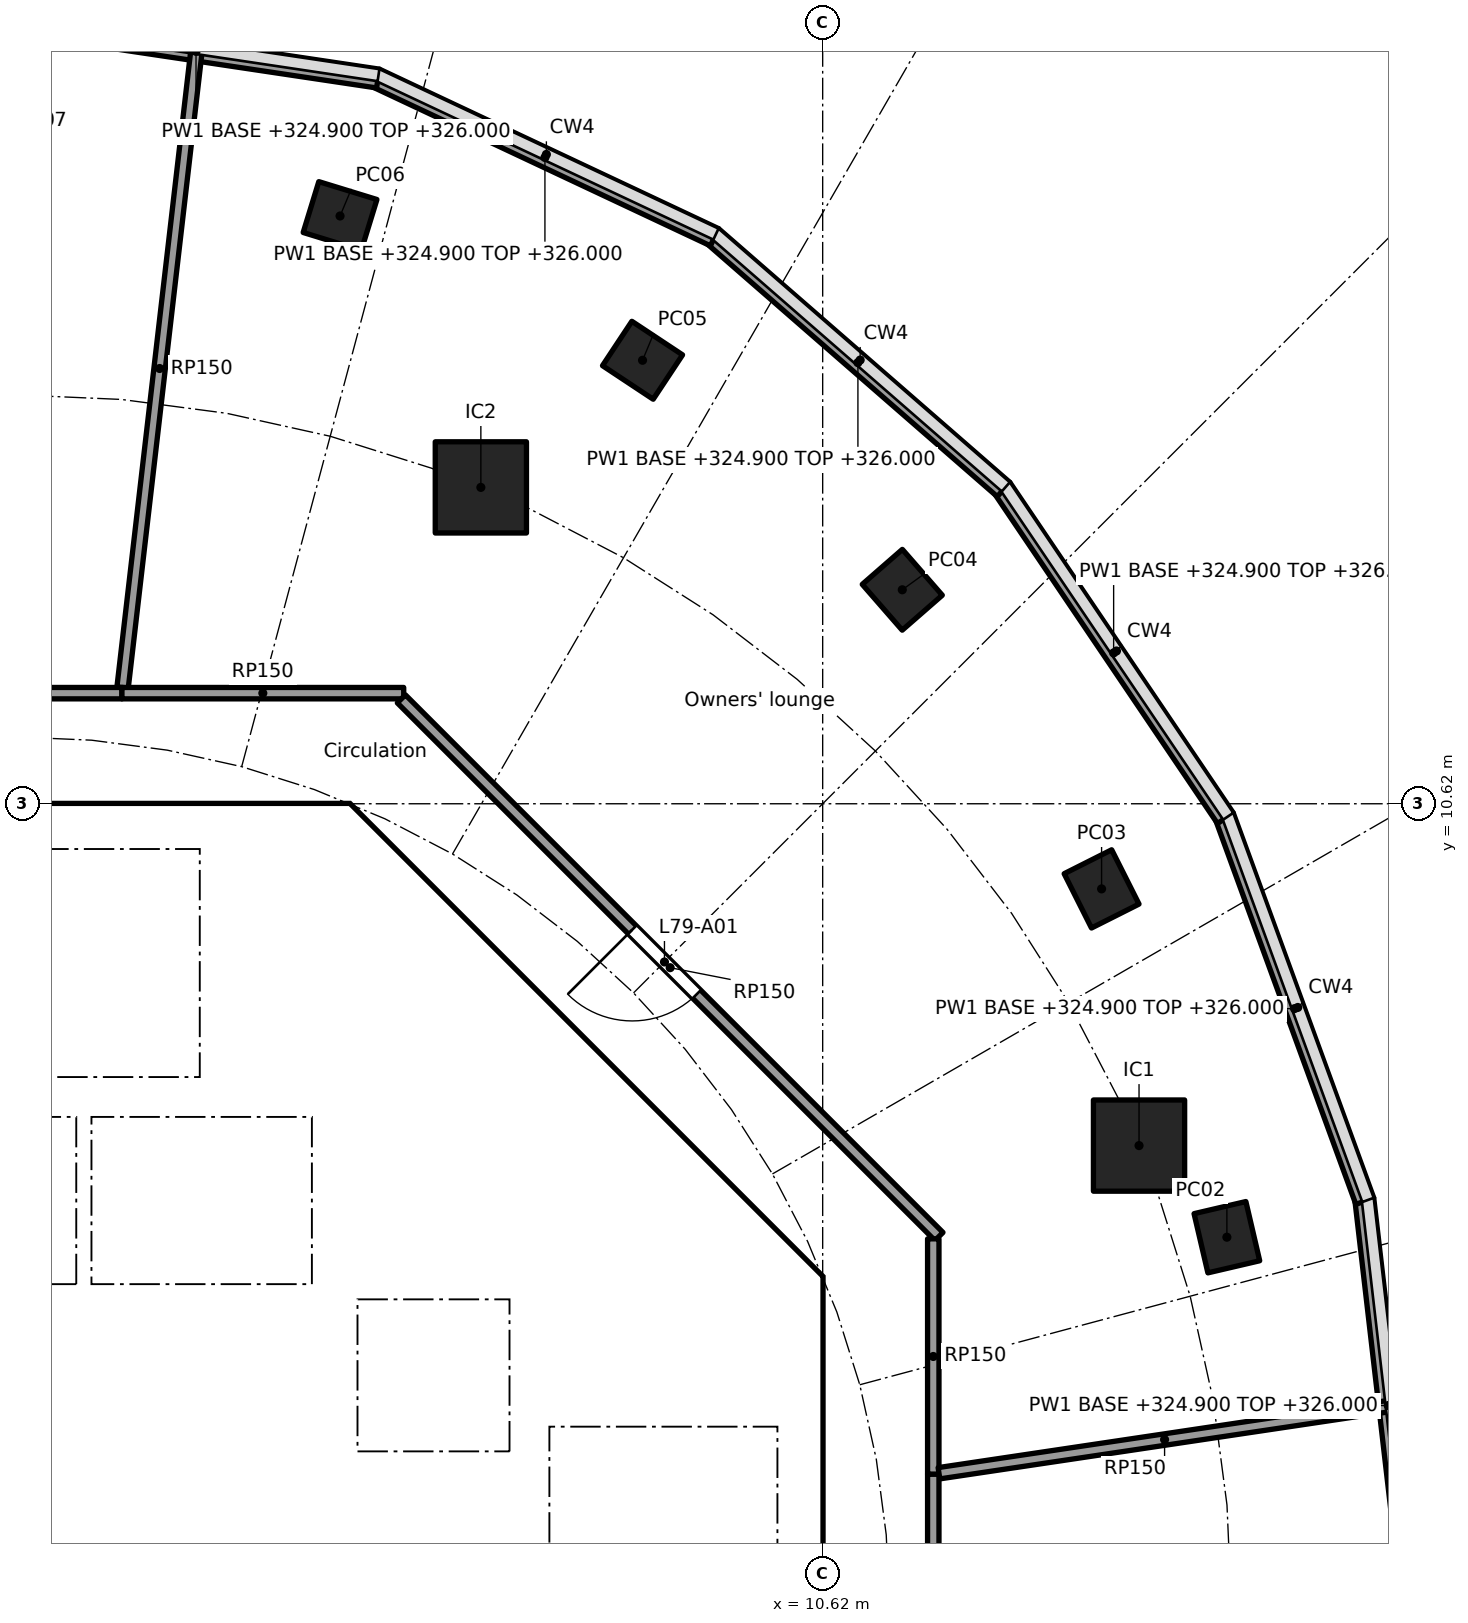
"""IFC4 building model, lengths in metres.
Left out: names, types, materials, properties, quantities, classifications, styles, units other than length and angle.
Written with IfcOpenShell. Run it as: python <this file> out.ifc"""

import sys

from ifc_helpers import new_model, si_unit, direction, frame, frame_2d, origin, origin_2d, place, context, subcontext, project, spatial, polyline, rectangle, hollow_rectangle, outline, extrude, element, fill, save


model = new_model("IFC4")
c1 = context("Model", 3, precision=1e-05, world=origin(), true_north=direction((0.0, 1.0)))
c2 = subcontext(c1, "Body", "Model", "MODEL_VIEW")
j1 = project(units=[si_unit("LENGTHUNIT", "METRE"), si_unit("PLANEANGLEUNIT", "RADIAN")], contexts=[c1])
p1 = place(None, origin())
s1 = spatial("IfcSite", under=j1, at=p1, CompositionType="ELEMENT")
p2 = place(p1, origin())
s2 = spatial("IfcBuilding", under=s1, at=p2, CompositionType="ELEMENT")
p3 = place(p2, frame((0.0, 0.0, 320.4)))
s3 = spatial("IfcBuildingStorey", under=s2, at=p3, CompositionType="ELEMENT", Elevation=320.4)
for number, where, z_axis, x_axis in (
    (1, (15.938, 4.917, 0.0), (0.0, 0.0, 1.0), (-0.227, 0.974, 0.0)),
    (2, (14.289, 9.5, 0.0), (0.0, 0.0, 1.0), (-0.45, 0.893, 0.0)),
    (3, (11.667, 13.435, 0.0), (0.0, 0.0, 1.0), (-0.657, 0.754, 0.0)),
    (4, (8.25, 16.455, 0.0), (0.0, 0.0, 1.0), (-0.834, 0.552, 0.0)),
    (5, (4.271, 18.353, 0.0), (0.0, 0.0, 1.0), (-0.956, 0.294, 0.0)),
):
    element("IfcColumn", number, at=place(p3, frame(where, z_axis=z_axis, x_axis=x_axis)), inside=s3, PredefinedType="COLUMN", context=c2, shape_type="SweptSolid", body=[
        extrude(hollow_rectangle(XDim=0.8, YDim=0.7, WallThickness=0.025, at=origin_2d()), origin(), (0.0, 0.0, 1.0), 4.5),
    ])
for number, where, z_axis, x_axis in (
    (6, (14.782, 6.123, 0.0), (0.0, 0.0, 1.0), (1.0, 0.0, 0.0)),
    (7, (6.123, 14.782, 0.0), (0.0, 0.0, 1.0), (1.0, 0.0, 0.0)),
):
    element("IfcColumn", number, at=place(p3, frame(where, z_axis=z_axis, x_axis=x_axis)), inside=s3, PredefinedType="COLUMN", context=c2, shape_type="SweptSolid", body=[
        extrude(rectangle(XDim=1.2, YDim=1.2, at=origin_2d()), origin(), (0.0, 0.0, 1.0), 4.5),
    ])
p4 = place(p3, frame((18.376, -0.014, 4.5), z_axis=(0.0, 0.0, 1.0), x_axis=(-0.115204975707, 0.993341740577, 0.0)))
e8 = element("IfcWall", 8, at=p4, inside=s3, PredefinedType="PARAPET", context=c2, shape_type="SweptSolid", body=[
    extrude(rectangle(XDim=5.472, YDim=0.25, at=frame_2d((2.736, 0.0))), origin(), (0.0, 0.0, 1.0), 1.1),
])
p5 = place(p3, frame((17.752, 5.392, 4.5), z_axis=(0.0, 0.0, 1.0), x_axis=(-0.342797263009, 0.939409408338, 0.0)))
e9 = element("IfcWall", 9, at=p5, inside=s3, PredefinedType="PARAPET", context=c2, shape_type="SweptSolid", body=[
    extrude(rectangle(XDim=5.391, YDim=0.25, at=frame_2d((2.696, 0.0))), origin(), (0.0, 0.0, 1.0), 1.1),
])
p6 = place(p3, frame((15.918, 10.43, 4.5), z_axis=(0.0, 0.0, 1.0), x_axis=(-0.560011865881, 0.828484586503, 0.0)))
e10 = element("IfcWall", 10, at=p6, inside=s3, PredefinedType="PARAPET", context=c2, shape_type="SweptSolid", body=[
    extrude(rectangle(XDim=5.25, YDim=0.25, at=frame_2d((2.625, 0.0))), origin(), (0.0, 0.0, 1.0), 1.1),
])
p7 = place(p3, frame((12.999, 14.755, 4.5), z_axis=(0.0, 0.0, 1.0), x_axis=(-0.754036302734, 0.656832744432, 0.0)))
e11 = element("IfcWall", 11, at=p7, inside=s3, PredefinedType="PARAPET", context=c2, shape_type="SweptSolid", body=[
    extrude(rectangle(XDim=5.081, YDim=0.25, at=frame_2d((2.541, 0.0))), origin(), (0.0, 0.0, 1.0), 1.1),
])
p8 = place(p3, frame((9.197, 18.073, 4.5), z_axis=(0.0, 0.0, 1.0), x_axis=(-0.904961168887, 0.425494163069, 0.0)))
e12 = element("IfcWall", 12, at=p8, inside=s3, PredefinedType="PARAPET", context=c2, shape_type="SweptSolid", body=[
    extrude(rectangle(XDim=4.93, YDim=0.25, at=frame_2d((2.465, 0.0))), origin(), (0.0, 0.0, 1.0), 1.1),
])
p9 = place(p3, frame((4.77, 20.161, 4.5), z_axis=(0.0, 0.0, 1.0), x_axis=(-0.989017208571, 0.147800409847, 0.0)))
e13 = element("IfcWall", 13, at=p9, inside=s3, PredefinedType="PARAPET", context=c2, shape_type="SweptSolid", body=[
    extrude(rectangle(XDim=4.842, YDim=0.25, at=frame_2d((2.421, 0.0))), origin(), (0.0, 0.0, 1.0), 1.1),
])
p10 = place(p3, frame((9.988, 4.613, 0.0), z_axis=(0.0, 0.0, 1.0), x_axis=(-0.707106781187, 0.707106781187, 0.0)))
e14 = element("IfcWall", 14, at=p10, inside=s3, PredefinedType="SHEAR", context=c2, shape_type="SweptSolid", body=[
    extrude(rectangle(XDim=7.602, YDim=0.6, at=frame_2d((3.801, 0.0))), origin(), (0.0, 0.0, 1.0), 4.2),
])
p11 = place(p10, frame((3.201, 0.0, 0.0)))
e15 = element("IfcOpeningElement", 15, at=p11, cuts=e14, PredefinedType="OPENING", context=c2, shape_type="SweptSolid", body=[
    extrude(rectangle(XDim=1.2, YDim=2.1, at=frame_2d((0.6, 1.05))), frame((0.0, 0.31, 0.0), z_axis=(0.0, -1.0, 0.0), x_axis=(1.0, 0.0, 0.0)), (0.0, 0.0, 1.0), 0.62),
])
p12 = place(p3, frame((4.0, 4.3, 0.0), z_axis=(0.0, 0.0, 1.0), x_axis=(0.0, 1.0, 0.0)))
e16 = element("IfcWall", 16, at=p12, inside=s3, PredefinedType="SOLIDWALL", context=c2, shape_type="SweptSolid", body=[
    extrude(rectangle(XDim=2.2, YDim=0.2, at=frame_2d((1.1, 0.0))), origin(), (0.0, 0.0, 1.0), 4.2),
])
p13 = place(p12, frame((0.55, 0.0, 0.0)))
e17 = element("IfcOpeningElement", 17, at=p13, cuts=e16, PredefinedType="OPENING", context=c2, shape_type="SweptSolid", body=[
    extrude(rectangle(XDim=1.1, YDim=2.1, at=frame_2d((0.55, 1.05))), frame((0.0, 0.11, 0.0), z_axis=(0.0, -1.0, 0.0), x_axis=(1.0, 0.0, 0.0)), (0.0, 0.0, 1.0), 0.22),
])
p14 = place(p3, frame((-6.7, 2.0, 0.0), z_axis=(0.0, 0.0, 1.0), x_axis=(1.0, 0.0, 0.0)))
e18 = element("IfcWall", 18, at=p14, inside=s3, PredefinedType="SOLIDWALL", context=c2, shape_type="SweptSolid", body=[
    extrude(rectangle(XDim=13.4, YDim=0.2, at=frame_2d((6.7, 0.0))), origin(), (0.0, 0.0, 1.0), 4.2),
])
p15 = place(p14, frame((11.65, 0.0, 0.0)))
e19 = element("IfcOpeningElement", 19, at=p15, cuts=e18, PredefinedType="OPENING", context=c2, shape_type="SweptSolid", body=[
    extrude(rectangle(XDim=1.1, YDim=2.1, at=frame_2d((0.55, 1.05))), frame((0.0, 0.11, 0.0), z_axis=(0.0, -1.0, 0.0), x_axis=(1.0, 0.0, 0.0)), (0.0, 0.0, 1.0), 0.22),
])
p16 = place(p14, frame((1.85, 0.0, 0.0)))
e20 = element("IfcOpeningElement", 20, at=p16, cuts=e18, PredefinedType="OPENING", context=c2, shape_type="SweptSolid", body=[
    extrude(rectangle(XDim=0.9, YDim=2.1, at=frame_2d((0.45, 1.05))), frame((0.0, 0.11, 0.0), z_axis=(0.0, -1.0, 0.0), x_axis=(1.0, 0.0, 0.0)), (0.0, 0.0, 1.0), 0.22),
])
p17 = place(p14, frame((5.15, 0.0, 0.0)))
e21 = element("IfcOpeningElement", 21, at=p17, cuts=e18, PredefinedType="OPENING", context=c2, shape_type="SweptSolid", body=[
    extrude(rectangle(XDim=0.9, YDim=2.1, at=frame_2d((0.45, 1.05))), frame((0.0, 0.11, 0.0), z_axis=(0.0, -1.0, 0.0), x_axis=(1.0, 0.0, 0.0)), (0.0, 0.0, 1.0), 0.22),
])
p18 = place(p14, frame((8.45, 0.0, 0.0)))
e22 = element("IfcOpeningElement", 22, at=p18, cuts=e18, PredefinedType="OPENING", context=c2, shape_type="SweptSolid", body=[
    extrude(rectangle(XDim=0.9, YDim=2.1, at=frame_2d((0.45, 1.05))), frame((0.0, 0.11, 0.0), z_axis=(0.0, -1.0, 0.0), x_axis=(1.0, 0.0, 0.0)), (0.0, 0.0, 1.0), 0.22),
])
p19 = place(p3, frame((6.7, 4.0, 0.0), z_axis=(0.0, 0.0, 1.0), x_axis=(1.0, 0.0, 0.0)))
e23 = element("IfcWall", 23, at=p19, inside=s3, PredefinedType="SOLIDWALL", context=c2, shape_type="SweptSolid", body=[
    extrude(rectangle(XDim=3.325, YDim=0.2, at=frame_2d((1.662, 0.0))), origin(), (0.0, 0.0, 1.0), 4.2),
])
p20 = place(p19, frame((1.25, 0.0, 0.0)))
e24 = element("IfcOpeningElement", 24, at=p20, cuts=e23, PredefinedType="OPENING", context=c2, shape_type="SweptSolid", body=[
    extrude(rectangle(XDim=1.1, YDim=2.1, at=frame_2d((0.55, 1.05))), frame((0.0, 0.11, 0.0), z_axis=(0.0, -1.0, 0.0), x_axis=(1.0, 0.0, 0.0)), (0.0, 0.0, 1.0), 0.22),
])
p21 = place(p3, frame((4.0, 7.025, 0.0), z_axis=(0.0, 0.0, 1.0), x_axis=(0.0, 1.0, 0.0)))
e25 = element("IfcWall", 25, at=p21, inside=s3, PredefinedType="SOLIDWALL", context=c2, shape_type="SweptSolid", body=[
    extrude(rectangle(XDim=3.0, YDim=0.2, at=frame_2d((1.5, 0.0))), origin(), (0.0, 0.0, 1.0), 4.2),
])
p22 = place(p21, frame((0.925, 0.0, 0.0)))
e26 = element("IfcOpeningElement", 26, at=p22, cuts=e25, PredefinedType="OPENING", context=c2, shape_type="SweptSolid", body=[
    extrude(rectangle(XDim=1.1, YDim=2.1, at=frame_2d((0.55, 1.05))), frame((0.0, 0.11, 0.0), z_axis=(0.0, -1.0, 0.0), x_axis=(1.0, 0.0, 0.0)), (0.0, 0.0, 1.0), 0.22),
])
p23 = place(p3, origin())
e27 = element("IfcWall", 27, at=p23, inside=s3, PredefinedType="SHEAR", context=c2, shape_type="SweptSolid", body=[
    extrude(outline(polyline([(-4.152, 10.025), (-4.401, 9.776), (-4.825, 10.2), (-4.401, 10.625), (4.401, 10.625), (4.825, 10.2), (4.401, 9.776), (4.152, 10.025), (-4.152, 10.025)])), origin(), (0.0, 0.0, 1.0), 4.2),
])
p24 = place(p3, origin())
e28 = element("IfcWall", 28, at=p24, inside=s3, PredefinedType="SHEAR", context=c2, shape_type="SweptSolid", body=[
    extrude(outline(polyline([(9.776, -4.401), (10.025, -4.152), (10.025, -3.801), (10.025, 4.152), (9.776, 4.401), (10.2, 4.825), (10.625, 4.401), (10.625, -4.401), (10.2, -4.825), (9.776, -4.401)])), origin(), (0.0, 0.0, 1.0), 4.2),
])
p25 = place(p3, frame((0.9, 4.3, 0.0), z_axis=(0.0, 0.0, 1.0), x_axis=(0.0, 1.0, 0.0)))
e29 = element("IfcWall", 29, at=p25, inside=s3, PredefinedType="SOLIDWALL", context=c2, shape_type="SweptSolid", body=[
    extrude(rectangle(XDim=2.2, YDim=0.2, at=frame_2d((1.1, 0.0))), origin(), (0.0, 0.0, 1.0), 4.2),
])
p26 = place(p3, origin())
e30 = element("IfcWall", 30, at=p26, inside=s3, PredefinedType="SOLIDWALL", context=c2, shape_type="SweptSolid", body=[
    extrude(outline(polyline([(-6.7, 4.3), (6.7, 4.3), (6.7, 2.1), (6.5, 2.1), (6.5, 4.1), (4.5, 4.1), (4.5, 2.1), (4.3, 2.1), (4.3, 4.1), (0.1, 4.1), (0.1, 2.1), (-0.1, 2.1), (-0.1, 4.1), (-2.1, 4.1), (-2.1, 2.1), (-2.3, 2.1), (-2.3, 4.1), (-6.5, 4.1), (-6.5, 2.1), (-6.7, 2.1), (-6.7, 4.3)])), origin(), (0.0, 0.0, 1.0), 4.2),
])
p27 = place(p3, origin())
e31 = element("IfcWall", 31, at=p27, inside=s3, PredefinedType="SOLIDWALL", context=c2, shape_type="SweptSolid", body=[
    extrude(outline(polyline([(4.1, 6.5), (-4.1, 6.5), (-4.1, 7.025), (4.1, 7.025), (4.1, 6.5)])), origin(), (0.0, 0.0, 1.0), 4.2),
])
p28 = place(p3, origin())
e32 = element("IfcWall", 32, at=p28, inside=s3, PredefinedType="SOLIDWALL", context=c2, shape_type="SweptSolid", body=[
    extrude(outline(polyline([(7.025, -3.9), (6.7, -3.9), (6.7, 3.9), (7.025, 3.9), (7.025, -3.9)])), origin(), (0.0, 0.0, 1.0), 4.2),
])
p29 = place(p3, frame((-4.895, 12.075, 0.0), z_axis=(0.0, 0.0, 1.0), x_axis=(1.0, 0.0, 0.0)))
e33 = element("IfcWall", 33, at=p29, inside=s3, PredefinedType="PARTITIONING", context=c2, shape_type="SweptSolid", body=[
    extrude(rectangle(XDim=6.296, YDim=0.15, at=frame_2d((3.148, 0.0))), origin(), (0.0, 0.0, 1.0), 4.2),
])
p30 = place(p29, frame((2.645, 0.0, 0.0)))
e34 = element("IfcOpeningElement", 34, at=p30, cuts=e33, PredefinedType="OPENING", context=c2, shape_type="SweptSolid", body=[
    extrude(rectangle(XDim=0.9, YDim=2.1, at=frame_2d((0.45, 1.05))), frame((0.0, 0.085, 0.0), z_axis=(0.0, -1.0, 0.0), x_axis=(1.0, 0.0, 0.0)), (0.0, 0.0, 1.0), 0.17),
])
p31 = place(p3, frame((1.41, 12.15, 0.0), z_axis=(0.0, 0.0, 1.0), x_axis=(0.115263493726, 0.993334952075, 0.0)))
e35 = element("IfcWall", 35, at=p31, inside=s3, PredefinedType="PARTITIONING", context=c2, shape_type="SweptSolid", body=[
    extrude(rectangle(XDim=8.449, YDim=0.15, at=frame_2d((4.225, 0.0))), origin(), (0.0, 0.0, 1.0), 4.2),
])
p32 = place(p3, frame((1.401, 12.075, 0.0), z_axis=(0.0, 0.0, 1.0), x_axis=(1.0, 0.0, 0.0)))
e36 = element("IfcWall", 36, at=p32, inside=s3, PredefinedType="PARTITIONING", context=c2, shape_type="SweptSolid", body=[
    extrude(rectangle(XDim=3.707, YDim=0.15, at=frame_2d((1.854, 0.0))), origin(), (0.0, 0.0, 1.0), 4.2),
])
p33 = place(p3, frame((5.077, 12.0, 0.0), z_axis=(0.0, 0.0, 1.0), x_axis=(0.707106781187, -0.707106781187, 0.0)))
e37 = element("IfcWall", 37, at=p33, inside=s3, PredefinedType="PARTITIONING", context=c2, shape_type="SweptSolid", body=[
    extrude(rectangle(XDim=10.003, YDim=0.15, at=frame_2d((5.001, 0.0))), origin(), (0.0, 0.0, 1.0), 4.2),
])
p34 = place(p33, frame((4.295, 0.0, 0.0)))
e38 = element("IfcOpeningElement", 38, at=p34, cuts=e37, PredefinedType="OPENING", context=c2, shape_type="SweptSolid", body=[
    extrude(rectangle(XDim=1.2, YDim=2.1, at=frame_2d((0.6, 1.05))), frame((0.0, 0.085, 0.0), z_axis=(0.0, -1.0, 0.0), x_axis=(1.0, 0.0, 0.0)), (0.0, 0.0, 1.0), 0.17),
])
p35 = place(p3, frame((12.075, 1.801, 0.0), z_axis=(0.0, 0.0, 1.0), x_axis=(0.0, -1.0, 0.0)))
e39 = element("IfcWall", 39, at=p35, inside=s3, PredefinedType="PARTITIONING", context=c2, shape_type="SweptSolid", body=[
    extrude(rectangle(XDim=6.696, YDim=0.15, at=frame_2d((3.348, 0.0))), origin(), (0.0, 0.0, 1.0), 4.2),
])
p36 = place(p3, frame((12.075, 4.896, 0.0), z_axis=(0.0, 0.0, 1.0), x_axis=(0.0, -1.0, 0.0)))
e40 = element("IfcWall", 40, at=p36, inside=s3, PredefinedType="PARTITIONING", context=c2, shape_type="SweptSolid", body=[
    extrude(rectangle(XDim=3.095, YDim=0.15, at=frame_2d((1.547, 0.0))), origin(), (0.0, 0.0, 1.0), 4.2),
])
p37 = place(p3, frame((18.086, 2.698, 0.0), z_axis=(0.0, 0.0, 1.0), x_axis=(-0.989039934914, -0.147648254801, 0.0)))
e41 = element("IfcWall", 41, at=p37, inside=s3, PredefinedType="PARTITIONING", context=c2, shape_type="SweptSolid", body=[
    extrude(rectangle(XDim=6.002, YDim=0.15, at=frame_2d((3.001, 0.0))), origin(), (0.0, 0.0, 1.0), 4.2),
])
p38 = place(p15, origin())
e42 = element("IfcDoor", 42, at=p38, inside=s3, OperationType="DOUBLE_DOOR_SLIDING", PredefinedType="DOOR", context=c2, shape_type="SweptSolid", body=[
    extrude(rectangle(XDim=1.1, YDim=2.1, at=frame_2d((0.55, 1.05))), frame((0.0, 0.025, 0.0), z_axis=(0.0, -1.0, 0.0), x_axis=(1.0, 0.0, 0.0)), (0.0, 0.0, 1.0), 0.05),
])
fill(e19, e42)
p39 = place(p13, origin())
e43 = element("IfcDoor", 43, at=p39, inside=s3, OperationType="DOUBLE_DOOR_SLIDING", PredefinedType="DOOR", context=c2, shape_type="SweptSolid", body=[
    extrude(rectangle(XDim=1.1, YDim=2.1, at=frame_2d((0.55, 1.05))), frame((0.0, 0.025, 0.0), z_axis=(0.0, -1.0, 0.0), x_axis=(1.0, 0.0, 0.0)), (0.0, 0.0, 1.0), 0.05),
])
fill(e17, e43)
p40 = place(p20, frame((1.1, 0.0, 0.0), x_axis=(-1.0, 0.0, 0.0)))
e44 = element("IfcDoor", 44, at=p40, inside=s3, OperationType="SINGLE_SWING_RIGHT", PredefinedType="DOOR", context=c2, shape_type="SweptSolid", body=[
    extrude(rectangle(XDim=1.1, YDim=2.1, at=frame_2d((0.55, 1.05))), frame((0.0, 0.025, 0.0), z_axis=(0.0, -1.0, 0.0), x_axis=(1.0, 0.0, 0.0)), (0.0, 0.0, 1.0), 0.05),
])
fill(e24, e44)
p41 = place(p22, origin())
e45 = element("IfcDoor", 45, at=p41, inside=s3, OperationType="SINGLE_SWING_LEFT", PredefinedType="DOOR", context=c2, shape_type="SweptSolid", body=[
    extrude(rectangle(XDim=1.1, YDim=2.1, at=frame_2d((0.55, 1.05))), frame((0.0, 0.025, 0.0), z_axis=(0.0, -1.0, 0.0), x_axis=(1.0, 0.0, 0.0)), (0.0, 0.0, 1.0), 0.05),
])
fill(e26, e45)
p42 = place(p18, origin())
e46 = element("IfcDoor", 46, at=p42, inside=s3, OperationType="SINGLE_SWING_LEFT", PredefinedType="DOOR", context=c2, shape_type="SweptSolid", body=[
    extrude(rectangle(XDim=0.9, YDim=2.1, at=frame_2d((0.45, 1.05))), frame((0.0, 0.025, 0.0), z_axis=(0.0, -1.0, 0.0), x_axis=(1.0, 0.0, 0.0)), (0.0, 0.0, 1.0), 0.05),
])
fill(e22, e46)
p43 = place(p11, origin())
e47 = element("IfcDoor", 47, at=p43, inside=s3, OperationType="SINGLE_SWING_LEFT", PredefinedType="DOOR", context=c2, shape_type="SweptSolid", body=[
    extrude(rectangle(XDim=1.2, YDim=2.1, at=frame_2d((0.6, 1.05))), frame((0.0, 0.025, 0.0), z_axis=(0.0, -1.0, 0.0), x_axis=(1.0, 0.0, 0.0)), (0.0, 0.0, 1.0), 0.05),
])
fill(e15, e47)
p44 = place(p34, frame((1.2, 0.0, 0.0), x_axis=(-1.0, 0.0, 0.0)))
e48 = element("IfcDoor", 48, at=p44, inside=s3, OperationType="SINGLE_SWING_RIGHT", PredefinedType="DOOR", context=c2, shape_type="SweptSolid", body=[
    extrude(rectangle(XDim=1.2, YDim=2.1, at=frame_2d((0.6, 1.05))), frame((0.0, 0.025, 0.0), z_axis=(0.0, -1.0, 0.0), x_axis=(1.0, 0.0, 0.0)), (0.0, 0.0, 1.0), 0.05),
])
fill(e38, e48)
save(model, sys.argv[1])
